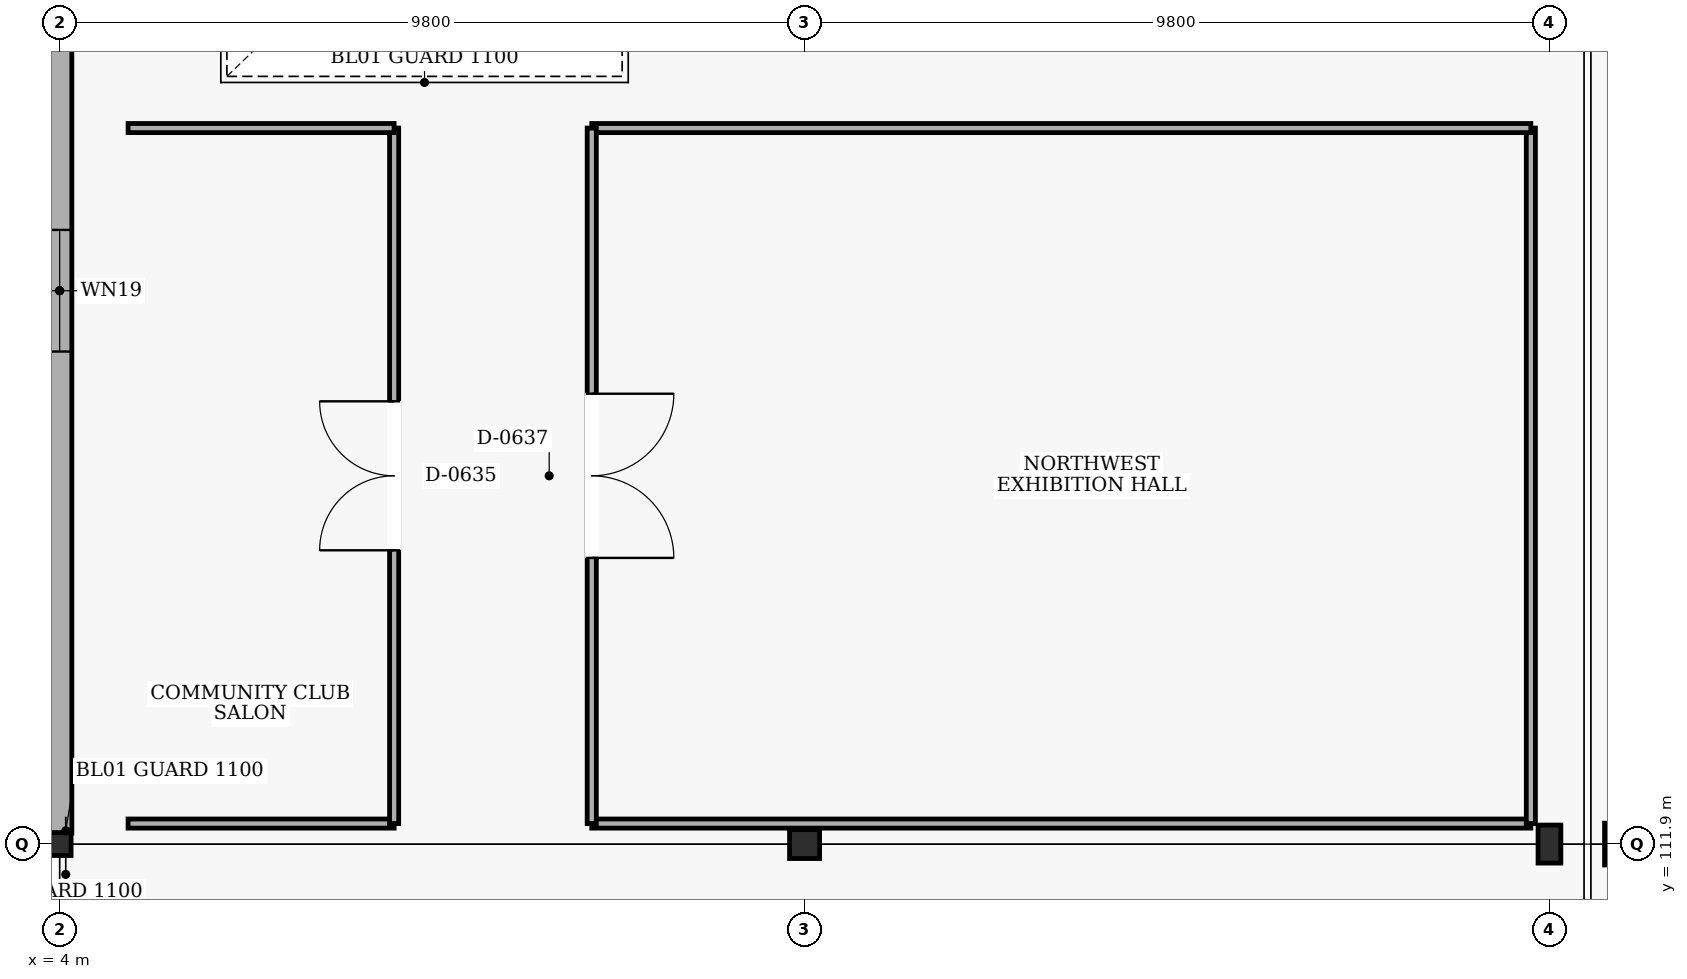
"""IFC4 building model, lengths in metres.
Left out: names, types, materials, properties, quantities, classifications, styles, units other than length and angle.
Written with IfcOpenShell. Run it as: python <this file> out.ifc"""

import sys

from ifc_helpers import new_model, si_unit, direction, frame, frame_2d, origin, origin_2d, place, context, subcontext, project, spatial, rectangle, hollow_rectangle, i_section, extrude, element, fill, save


model = new_model("IFC4")
c1 = context("Model", 3, precision=1e-05, world=origin(), true_north=direction((0.0, 1.0)))
c2 = subcontext(c1, "Body", "Model", "MODEL_VIEW")
j1 = project(units=[si_unit("LENGTHUNIT", "METRE"), si_unit("PLANEANGLEUNIT", "RADIAN")], contexts=[c1])
p1 = place(None, origin())
s1 = spatial("IfcSite", under=j1, at=p1, CompositionType="ELEMENT")
p2 = place(p1, origin())
s2 = spatial("IfcBuilding", under=s1, at=p2, CompositionType="ELEMENT")
p3 = place(p2, frame((0.0, 0.0, 10.2)))
s3 = spatial("IfcBuildingStorey", under=s2, at=p3, CompositionType="ELEMENT", Elevation=10.2)
p4 = place(p3, frame((4.0, 111.9, 0.0), z_axis=(0.0, 0.0, 1.0), x_axis=(1.0, 0.0, 0.0)))
e1 = element("IfcColumn", 1, at=p4, inside=s3, PredefinedType="COLUMN", context=c2, shape_type="SweptSolid", body=[
    extrude(hollow_rectangle(XDim=0.3, YDim=0.3, WallThickness=0.016, at=origin_2d()), origin(), (0.0, 0.0, 1.0), 4.8),
])
p5 = place(p3, frame((13.8, 111.9, 0.0), z_axis=(0.0, 0.0, 1.0), x_axis=(1.0, 0.0, 0.0)))
e2 = element("IfcColumn", 2, at=p5, inside=s3, PredefinedType="COLUMN", context=c2, shape_type="SweptSolid", body=[
    extrude(i_section(OverallWidth=0.395, OverallDepth=0.38, WebThickness=0.019, FlangeThickness=0.03, at=origin_2d()), origin(), (0.0, 0.0, 1.0), 4.8),
])
p6 = place(p3, frame((23.6, 111.9, 0.0), z_axis=(0.0, 0.0, 1.0), x_axis=(1.0, 0.0, 0.0)))
e3 = element("IfcColumn", 3, at=p6, inside=s3, PredefinedType="COLUMN", context=c2, shape_type="SweptSolid", body=[
    extrude(i_section(OverallWidth=0.3, OverallDepth=0.5, WebThickness=0.014, FlangeThickness=0.028, at=origin_2d()), origin(), (0.0, 0.0, 1.0), 4.8),
])
p7 = place(p3, frame((24.6, 111.9, 0.0), z_axis=(0.0, 0.0, 1.0), x_axis=(1.0, 0.0, 0.0)))
e4 = element("IfcColumn", 4, at=p7, inside=s3, PredefinedType="COLUMN", context=c2, shape_type="SweptSolid", body=[
    extrude(rectangle(XDim=0.55, YDim=0.55, at=origin_2d()), origin(), (0.0, 0.0, 1.0), 4.8),
])
p8 = place(p3, frame((4.0, 112.045, 0.0), z_axis=(0.0, 0.0, 1.0), x_axis=(0.0, 1.0, 0.0)))
e5 = element("IfcWall", 5, at=p8, inside=s3, PredefinedType="SOLIDWALL", context=c2, shape_type="SweptSolid", body=[
    extrude(rectangle(XDim=14.27, YDim=0.32, at=frame_2d((7.135, 0.0))), origin(), (0.0, 0.0, 1.0), 3.97),
])
p9 = place(p8, frame((6.335, 0.0, 0.9)))
e6 = element("IfcOpeningElement", 6, at=p9, cuts=e5, PredefinedType="OPENING", context=c2, shape_type="SweptSolid", body=[
    extrude(rectangle(XDim=1.6, YDim=2.4, at=frame_2d((0.8, 1.2))), frame((0.0, 0.17, 0.0), z_axis=(0.0, -1.0, 0.0), x_axis=(1.0, 0.0, 0.0)), (0.0, 0.0, 1.0), 0.34),
])
p10 = place(p3, frame((4.9, 112.17, 0.0), z_axis=(0.0, 0.0, 1.0), x_axis=(1.0, 0.0, 0.0)))
e7 = element("IfcWall", 7, at=p10, inside=s3, PredefinedType="PARTITIONING", context=c2, shape_type="SweptSolid", body=[
    extrude(rectangle(XDim=3.5, YDim=0.12, at=frame_2d((1.75, 0.0))), origin(), (0.0, 0.0, 1.0), 3.82),
])
p11 = place(p3, frame((8.4, 112.17, 0.0), z_axis=(0.0, 0.0, 1.0), x_axis=(0.0, 1.0, 0.0)))
e8 = element("IfcWall", 8, at=p11, inside=s3, PredefinedType="PARTITIONING", context=c2, shape_type="SweptSolid", body=[
    extrude(rectangle(XDim=9.15, YDim=0.12, at=frame_2d((4.575, 0.0))), origin(), (0.0, 0.0, 1.0), 4.48),
])
p12 = place(p11, frame((3.595, 0.0, 0.0)))
e9 = element("IfcOpeningElement", 9, at=p12, cuts=e8, PredefinedType="OPENING", context=c2, shape_type="SweptSolid", body=[
    extrude(rectangle(XDim=1.96, YDim=2.3, at=frame_2d((0.98, 1.15))), frame((0.0, 0.07, 0.0), z_axis=(0.0, -1.0, 0.0), x_axis=(1.0, 0.0, 0.0)), (0.0, 0.0, 1.0), 0.14),
])
p13 = place(p3, frame((8.4, 121.32, 0.0), z_axis=(0.0, 0.0, 1.0), x_axis=(-1.0, 0.0, 0.0)))
e10 = element("IfcWall", 10, at=p13, inside=s3, PredefinedType="PARTITIONING", context=c2, shape_type="SweptSolid", body=[
    extrude(rectangle(XDim=3.5, YDim=0.12, at=frame_2d((1.75, 0.0))), origin(), (0.0, 0.0, 1.0), 4.48),
])
p14 = place(p3, frame((11.0, 112.17, 0.0), z_axis=(0.0, 0.0, 1.0), x_axis=(1.0, 0.0, 0.0)))
e11 = element("IfcWall", 11, at=p14, inside=s3, PredefinedType="PARTITIONING", context=c2, shape_type="SweptSolid", body=[
    extrude(rectangle(XDim=12.355, YDim=0.12, at=frame_2d((6.177, 0.0))), origin(), (0.0, 0.0, 1.0), 3.82),
])
p15 = place(p3, frame((23.355, 112.17, 0.0), z_axis=(0.0, 0.0, 1.0), x_axis=(0.0, 1.0, 0.0)))
e12 = element("IfcWall", 12, at=p15, inside=s3, PredefinedType="PARTITIONING", context=c2, shape_type="SweptSolid", body=[
    extrude(rectangle(XDim=9.15, YDim=0.12, at=frame_2d((4.575, 0.0))), origin(), (0.0, 0.0, 1.0), 3.97),
])
p16 = place(p3, frame((23.355, 121.32, 0.0), z_axis=(0.0, 0.0, 1.0), x_axis=(-1.0, 0.0, 0.0)))
e13 = element("IfcWall", 13, at=p16, inside=s3, PredefinedType="PARTITIONING", context=c2, shape_type="SweptSolid", body=[
    extrude(rectangle(XDim=12.355, YDim=0.12, at=frame_2d((6.177, 0.0))), origin(), (0.0, 0.0, 1.0), 4.48),
])
p17 = place(p3, frame((11.0, 121.32, 0.0), z_axis=(0.0, 0.0, 1.0), x_axis=(0.0, -1.0, 0.0)))
e14 = element("IfcWall", 14, at=p17, inside=s3, PredefinedType="PARTITIONING", context=c2, shape_type="SweptSolid", body=[
    extrude(rectangle(XDim=9.15, YDim=0.12, at=frame_2d((4.575, 0.0))), origin(), (0.0, 0.0, 1.0), 4.48),
])
p18 = place(p17, frame((3.495, 0.0, 0.0)))
e15 = element("IfcOpeningElement", 15, at=p18, cuts=e14, PredefinedType="OPENING", context=c2, shape_type="SweptSolid", body=[
    extrude(rectangle(XDim=2.16, YDim=2.35, at=frame_2d((1.08, 1.175))), frame((0.0, 0.07, 0.0), z_axis=(0.0, -1.0, 0.0), x_axis=(1.0, 0.0, 0.0)), (0.0, 0.0, 1.0), 0.14),
])
p19 = place(p9, origin())
e16 = element("IfcWindow", 16, at=p19, inside=s3, PartitioningType="SINGLE_PANEL", PredefinedType="WINDOW", context=c2, shape_type="SweptSolid", body=[
    extrude(rectangle(XDim=1.6, YDim=2.4, at=frame_2d((0.8, 1.2))), frame((0.0, 0.03, 0.0), z_axis=(0.0, -1.0, 0.0), x_axis=(1.0, 0.0, 0.0)), (0.0, 0.0, 1.0), 0.06),
])
fill(e6, e16)
p20 = place(p12, origin())
e17 = element("IfcDoor", 17, at=p20, inside=s3, OperationType="DOUBLE_DOOR_SINGLE_SWING", PredefinedType="DOOR", context=c2, shape_type="SweptSolid", body=[
    extrude(rectangle(XDim=1.96, YDim=2.3, at=frame_2d((0.98, 1.15))), frame((0.0, 0.025, 0.0), z_axis=(0.0, -1.0, 0.0), x_axis=(1.0, 0.0, 0.0)), (0.0, 0.0, 1.0), 0.05),
])
fill(e9, e17)
p21 = place(p18, origin())
e18 = element("IfcDoor", 18, at=p21, inside=s3, OperationType="DOUBLE_DOOR_SINGLE_SWING", PredefinedType="DOOR", context=c2, shape_type="SweptSolid", body=[
    extrude(rectangle(XDim=2.16, YDim=2.35, at=frame_2d((1.08, 1.175))), frame((0.0, 0.025, 0.0), z_axis=(0.0, -1.0, 0.0), x_axis=(1.0, 0.0, 0.0)), (0.0, 0.0, 1.0), 0.05),
])
fill(e15, e18)
save(model, sys.argv[1])
